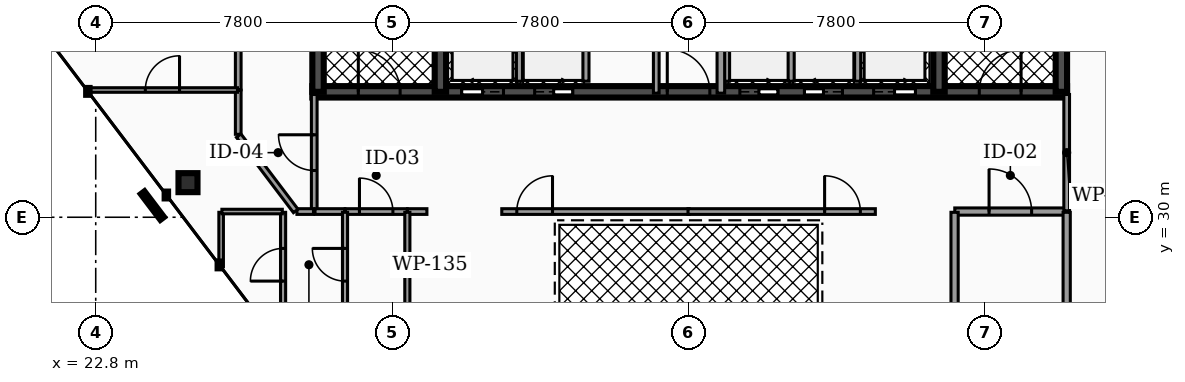
"""IFC4 building model, lengths in metres.
Left out: names, types, materials, properties, quantities, classifications, styles, units other than length and angle.
Written with IfcOpenShell. Run it as: python <this file> out.ifc"""

import sys

from ifc_helpers import new_model, si_unit, direction, frame, frame_2d, origin, origin_2d, place, context, subcontext, project, spatial, rectangle, hollow_rectangle, extrude, element, fill, save


model = new_model("IFC4")
c1 = context("Model", 3, precision=1e-05, world=origin(), true_north=direction((0.0, 1.0)))
c2 = subcontext(c1, "Body", "Model", "MODEL_VIEW")
j1 = project(units=[si_unit("LENGTHUNIT", "METRE"), si_unit("PLANEANGLEUNIT", "RADIAN")], contexts=[c1])
p1 = place(None, origin())
s1 = spatial("IfcSite", under=j1, at=p1, CompositionType="ELEMENT")
p2 = place(p1, origin())
s2 = spatial("IfcBuilding", under=s1, at=p2, CompositionType="ELEMENT")
p3 = place(p2, frame((0.0, 0.0, 258.4)))
s3 = spatial("IfcBuildingStorey", under=s2, at=p3, CompositionType="ELEMENT", Elevation=258.4)
p4 = place(p3, frame((28.5, 33.3, 0.0), z_axis=(0.0, 0.0, 1.0), x_axis=(1.0, 0.0, 0.0)))
e1 = element("IfcWall", 1, at=p4, inside=s3, PredefinedType="SHEAR", context=c2, shape_type="SweptSolid", body=[
    extrude(rectangle(XDim=19.86, YDim=0.3, at=frame_2d((9.93, 0.0))), origin(), (0.0, 0.0, 1.0), 3.18),
])
p5 = place(p4, frame((3.93, 0.0, 0.0)))
e2 = element("IfcOpeningElement", 2, at=p5, cuts=e1, PredefinedType="OPENING", context=c2, shape_type="SweptSolid", body=[
    extrude(rectangle(XDim=1.1, YDim=2.15, at=frame_2d((0.55, 1.075))), frame((0.0, 0.16, 0.0), z_axis=(0.0, -1.0, 0.0), x_axis=(1.0, 0.0, 0.0)), (0.0, 0.0, 1.0), 0.32),
])
p6 = place(p4, frame((14.77, 0.0, 0.0)))
e3 = element("IfcOpeningElement", 3, at=p6, cuts=e1, PredefinedType="OPENING", context=c2, shape_type="SweptSolid", body=[
    extrude(rectangle(XDim=1.1, YDim=2.15, at=frame_2d((0.55, 1.075))), frame((0.0, 0.16, 0.0), z_axis=(0.0, -1.0, 0.0), x_axis=(1.0, 0.0, 0.0)), (0.0, 0.0, 1.0), 0.32),
])
p7 = place(p4, frame((11.25, 0.0, 0.0)))
e4 = element("IfcOpeningElement", 4, at=p7, cuts=e1, PredefinedType="OPENING", context=c2, shape_type="SweptSolid", body=[
    extrude(rectangle(XDim=1.0, YDim=2.1, at=frame_2d((0.5, 1.05))), frame((0.0, 0.16, 0.0), z_axis=(0.0, -1.0, 0.0), x_axis=(1.0, 0.0, 0.0)), (0.0, 0.0, 1.0), 0.32),
])
p8 = place(p4, frame((12.95, 0.0, 0.0)))
e5 = element("IfcOpeningElement", 5, at=p8, cuts=e1, PredefinedType="OPENING", context=c2, shape_type="SweptSolid", body=[
    extrude(rectangle(XDim=1.0, YDim=2.1, at=frame_2d((0.5, 1.05))), frame((0.0, 0.16, 0.0), z_axis=(0.0, -1.0, 0.0), x_axis=(1.0, 0.0, 0.0)), (0.0, 0.0, 1.0), 0.32),
])
p9 = place(p4, frame((5.85, 0.0, 0.0)))
e6 = element("IfcOpeningElement", 6, at=p9, cuts=e1, PredefinedType="OPENING", context=c2, shape_type="SweptSolid", body=[
    extrude(rectangle(XDim=1.0, YDim=2.1, at=frame_2d((0.5, 1.05))), frame((0.0, 0.16, 0.0), z_axis=(0.0, -1.0, 0.0), x_axis=(1.0, 0.0, 0.0)), (0.0, 0.0, 1.0), 0.32),
])
p10 = place(p4, frame((1.21, 0.0, 0.0)))
e7 = element("IfcOpeningElement", 7, at=p10, cuts=e1, PredefinedType="OPENING", context=c2, shape_type="SweptSolid", body=[
    extrude(rectangle(XDim=1.1, YDim=2.2, at=frame_2d((0.55, 1.1))), frame((0.0, 0.16, 0.0), z_axis=(0.0, -1.0, 0.0), x_axis=(1.0, 0.0, 0.0)), (0.0, 0.0, 1.0), 0.32),
])
p11 = place(p4, frame((9.34, 0.0, 0.0)))
e8 = element("IfcOpeningElement", 8, at=p11, cuts=e1, PredefinedType="OPENING", context=c2, shape_type="SweptSolid", body=[
    extrude(rectangle(XDim=1.12, YDim=2.05, at=frame_2d((0.56, 1.025))), frame((0.0, 0.16, 0.0), z_axis=(0.0, -1.0, 0.0), x_axis=(1.0, 0.0, 0.0)), (0.0, 0.0, 1.0), 0.32),
])
p12 = place(p4, frame((17.55, 0.0, 0.0)))
e9 = element("IfcOpeningElement", 9, at=p12, cuts=e1, PredefinedType="OPENING", context=c2, shape_type="SweptSolid", body=[
    extrude(rectangle(XDim=1.1, YDim=2.2, at=frame_2d((0.55, 1.1))), frame((0.0, 0.16, 0.0), z_axis=(0.0, -1.0, 0.0), x_axis=(1.0, 0.0, 0.0)), (0.0, 0.0, 1.0), 0.32),
])
for number, where, z_axis, x_axis in (
    (10, (28.65, 33.3, 0.0), (0.0, 0.0, 1.0), (0.0, 1.0, 0.0)),
    (11, (31.87, 33.3, 0.0), (0.0, 0.0, 1.0), (0.0, 1.0, 0.0)),
    (12, (44.99, 33.3, 0.0), (0.0, 0.0, 1.0), (0.0, 1.0, 0.0)),
    (13, (48.21, 33.3, 0.0), (0.0, 0.0, 1.0), (0.0, 1.0, 0.0)),
):
    element("IfcWall", number, at=place(p3, frame(where, z_axis=z_axis, x_axis=x_axis)), inside=s3, PredefinedType="SHEAR", context=c2, shape_type="SweptSolid", body=[
        extrude(rectangle(XDim=10.1, YDim=0.3, at=frame_2d((5.05, 0.0))), origin(), (0.0, 0.0, 1.0), 3.18),
    ])
p13 = place(p3, frame((25.228, 30.91, 0.0), z_axis=(0.0, 0.0, 1.0), x_axis=(1.0, 0.0, 0.0)))
e14 = element("IfcColumn", 14, at=p13, inside=s3, PredefinedType="COLUMN", context=c2, shape_type="SweptSolid", body=[
    extrude(hollow_rectangle(XDim=0.5, YDim=0.5, WallThickness=0.025, at=origin_2d()), origin(), (0.0, 0.0, 1.0), 3.18),
])
for number, where, z_axis, x_axis in (
    (15, (33.95, 33.58, 0.0), (0.0, 0.0, 1.0), (0.0, 1.0, 0.0)),
    (16, (42.85, 33.58, 0.0), (0.0, 0.0, 1.0), (0.0, 1.0, 0.0)),
):
    element("IfcWall", number, at=place(p3, frame(where, z_axis=z_axis, x_axis=x_axis)), inside=s3, PredefinedType="SOLIDWALL", context=c2, shape_type="SweptSolid", body=[
        extrude(rectangle(XDim=2.45, YDim=0.16, at=frame_2d((1.225, 0.0))), origin(), (0.0, 0.0, 1.0), 3.18),
    ])
for number, where, z_axis, x_axis in (
    (17, (39.4, 33.58, 0.0), (0.0, 0.0, 1.0), (0.0, 1.0, 0.0)),
    (18, (41.1, 33.58, 0.0), (0.0, 0.0, 1.0), (0.0, 1.0, 0.0)),
    (19, (35.7, 33.58, 0.0), (0.0, 0.0, 1.0), (0.0, 1.0, 0.0)),
):
    element("IfcWall", number, at=place(p3, frame(where, z_axis=z_axis, x_axis=x_axis)), inside=s3, PredefinedType="SOLIDWALL", context=c2, shape_type="SweptSolid", body=[
        extrude(rectangle(XDim=2.25, YDim=0.16, at=frame_2d((1.125, 0.0))), origin(), (0.0, 0.0, 1.0), 3.18),
    ])
p14 = place(p3, frame((37.55, 33.265, 0.0), z_axis=(0.0, 0.0, 1.0), x_axis=(0.0, 1.0, 0.0)))
e20 = element("IfcWall", 20, at=p14, inside=s3, PredefinedType="PARTITIONING", context=c2, shape_type="SweptSolid", body=[
    extrude(rectangle(XDim=3.615, YDim=0.15, at=frame_2d((1.808, 0.0))), origin(), (0.0, 0.0, 1.0), 2.235),
])
p15 = place(p14, frame((1.337, 0.0, 0.0)))
e21 = element("IfcOpeningElement", 21, at=p15, cuts=e20, PredefinedType="OPENING", context=c2, shape_type="SweptSolid", body=[
    extrude(rectangle(XDim=0.94, YDim=2.05, at=frame_2d((0.47, 1.025))), frame((0.0, 0.085, 0.0), z_axis=(0.0, -1.0, 0.0), x_axis=(1.0, 0.0, 0.0)), (0.0, 0.0, 1.0), 0.17),
])
p16 = place(p3, frame((39.25, 33.265, 0.0), z_axis=(0.0, 0.0, 1.0), x_axis=(0.0, 1.0, 0.0)))
e22 = element("IfcWall", 22, at=p16, inside=s3, PredefinedType="PARTITIONING", context=c2, shape_type="SweptSolid", body=[
    extrude(rectangle(XDim=3.615, YDim=0.2, at=frame_2d((1.808, 0.0))), origin(), (0.0, 0.0, 1.0), 2.235),
])
p17 = place(p3, frame((45.405, 30.15, 0.0), z_axis=(0.0, 0.0, 1.0), x_axis=(1.0, 0.0, 0.0)))
e23 = element("IfcWall", 23, at=p17, inside=s3, PredefinedType="PARTITIONING", context=c2, shape_type="SweptSolid", body=[
    extrude(rectangle(XDim=2.925, YDim=0.19, at=frame_2d((1.462, 0.0))), origin(), (0.0, 0.0, 1.0), 2.235),
])
p18 = place(p17, frame((0.903, 0.0, 0.0)))
e24 = element("IfcOpeningElement", 24, at=p18, cuts=e23, PredefinedType="OPENING", context=c2, shape_type="SweptSolid", body=[
    extrude(rectangle(XDim=1.12, YDim=2.05, at=frame_2d((0.56, 1.025))), frame((0.0, 0.105, 0.0), z_axis=(0.0, -1.0, 0.0), x_axis=(1.0, 0.0, 0.0)), (0.0, 0.0, 1.0), 0.21),
])
p19 = place(p3, frame((28.55, 30.17, 0.0), z_axis=(0.0, 0.0, 1.0), x_axis=(0.0, 1.0, 0.0)))
e25 = element("IfcWall", 25, at=p19, inside=s3, PredefinedType="PARTITIONING", context=c2, shape_type="SweptSolid", body=[
    extrude(rectangle(XDim=3.06, YDim=0.15, at=frame_2d((1.53, 0.0))), origin(), (0.0, 0.0, 1.0), 2.235),
])
p20 = place(p19, frame((1.06, 0.0, 0.0)))
e26 = element("IfcOpeningElement", 26, at=p20, cuts=e25, PredefinedType="OPENING", context=c2, shape_type="SweptSolid", body=[
    extrude(rectangle(XDim=0.94, YDim=2.05, at=frame_2d((0.47, 1.025))), frame((0.0, 0.085, 0.0), z_axis=(0.0, -1.0, 0.0), x_axis=(1.0, 0.0, 0.0)), (0.0, 0.0, 1.0), 0.17),
])
p21 = place(p3, frame((48.35, 30.17, 0.0), z_axis=(0.0, 0.0, 1.0), x_axis=(0.0, 1.0, 0.0)))
e27 = element("IfcWall", 27, at=p21, inside=s3, PredefinedType="PARTITIONING", context=c2, shape_type="SweptSolid", body=[
    extrude(rectangle(XDim=3.06, YDim=0.15, at=frame_2d((1.53, 0.0))), origin(), (0.0, 0.0, 1.0), 2.235),
])
p22 = place(p3, frame((28.57, 30.15, 0.0), z_axis=(0.0, 0.0, 1.0), x_axis=(1.0, 0.0, 0.0)))
e28 = element("IfcWall", 28, at=p22, inside=s3, PredefinedType="PARTITIONING", context=c2, shape_type="SweptSolid", body=[
    extrude(rectangle(XDim=0.785, YDim=0.15, at=frame_2d((0.393, 0.0))), origin(), (0.0, 0.0, 1.0), 2.235),
])
p23 = place(p3, frame((29.365, 30.15, 0.0), z_axis=(0.0, 0.0, 1.0), x_axis=(1.0, 0.0, 0.0)))
e29 = element("IfcWall", 29, at=p23, inside=s3, PredefinedType="PARTITIONING", context=c2, shape_type="SweptSolid", body=[
    extrude(rectangle(XDim=1.63, YDim=0.15, at=frame_2d((0.815, 0.0))), origin(), (0.0, 0.0, 1.0), 2.235),
])
p24 = place(p23, frame((0.375, 0.0, 0.0)))
e30 = element("IfcOpeningElement", 30, at=p24, cuts=e29, PredefinedType="OPENING", context=c2, shape_type="SweptSolid", body=[
    extrude(rectangle(XDim=0.88, YDim=2.05, at=frame_2d((0.44, 1.025))), frame((0.0, 0.085, 0.0), z_axis=(0.0, -1.0, 0.0), x_axis=(1.0, 0.0, 0.0)), (0.0, 0.0, 1.0), 0.17),
])
p25 = place(p3, frame((33.485, 30.15, 0.0), z_axis=(0.0, 0.0, 1.0), x_axis=(1.0, 0.0, 0.0)))
e31 = element("IfcWall", 31, at=p25, inside=s3, PredefinedType="PARTITIONING", context=c2, shape_type="SweptSolid", body=[
    extrude(rectangle(XDim=4.93, YDim=0.15, at=frame_2d((2.465, 0.0))), origin(), (0.0, 0.0, 1.0), 2.235),
])
p26 = place(p25, frame((0.395, 0.0, 0.0)))
e32 = element("IfcOpeningElement", 32, at=p26, cuts=e31, PredefinedType="OPENING", context=c2, shape_type="SweptSolid", body=[
    extrude(rectangle(XDim=0.94, YDim=2.05, at=frame_2d((0.47, 1.025))), frame((0.0, 0.085, 0.0), z_axis=(0.0, -1.0, 0.0), x_axis=(1.0, 0.0, 0.0)), (0.0, 0.0, 1.0), 0.17),
])
p27 = place(p3, frame((31.005, 30.15, 0.0), z_axis=(0.0, 0.0, 1.0), x_axis=(1.0, 0.0, 0.0)))
e33 = element("IfcWall", 33, at=p27, inside=s3, PredefinedType="PARTITIONING", context=c2, shape_type="SweptSolid", body=[
    extrude(rectangle(XDim=0.51, YDim=0.15, at=frame_2d((0.255, 0.0))), origin(), (0.0, 0.0, 1.0), 2.235),
])
p28 = place(p3, frame((38.385, 30.15, 0.0), z_axis=(0.0, 0.0, 1.0), x_axis=(1.0, 0.0, 0.0)))
e34 = element("IfcWall", 34, at=p28, inside=s3, PredefinedType="PARTITIONING", context=c2, shape_type="SweptSolid", body=[
    extrude(rectangle(XDim=4.93, YDim=0.15, at=frame_2d((2.465, 0.0))), origin(), (0.0, 0.0, 1.0), 2.235),
])
p29 = place(p28, frame((3.595, 0.0, 0.0)))
e35 = element("IfcOpeningElement", 35, at=p29, cuts=e34, PredefinedType="OPENING", context=c2, shape_type="SweptSolid", body=[
    extrude(rectangle(XDim=0.94, YDim=2.05, at=frame_2d((0.47, 1.025))), frame((0.0, 0.085, 0.0), z_axis=(0.0, -1.0, 0.0), x_axis=(1.0, 0.0, 0.0)), (0.0, 0.0, 1.0), 0.17),
])
for number, where, z_axis, x_axis in (
    (36, (45.4, 27.37, 0.0), (0.0, 0.0, 1.0), (0.0, 1.0, 0.0)),
    (37, (48.35, 27.37, 0.0), (0.0, 0.0, 1.0), (0.0, 1.0, 0.0)),
):
    element("IfcWall", number, at=place(p3, frame(where, z_axis=z_axis, x_axis=x_axis)), inside=s3, PredefinedType="PARTITIONING", context=c2, shape_type="SweptSolid", body=[
        extrude(rectangle(XDim=2.76, YDim=0.19, at=frame_2d((1.38, 0.0))), origin(), (0.0, 0.0, 1.0), 2.235),
    ])
p30 = place(p3, frame((28.094, 30.15, 0.0), z_axis=(0.0, 0.0, 1.0), x_axis=(1.0, 0.0, 0.0)))
e38 = element("IfcWall", 38, at=p30, inside=s3, PredefinedType="PARTITIONING", context=c2, shape_type="SweptSolid", body=[
    extrude(rectangle(XDim=0.436, YDim=0.15, at=frame_2d((0.218, 0.0))), origin(), (0.0, 0.0, 1.0), 2.235),
])
p31 = place(p3, frame((26.55, 33.353, 0.0), z_axis=(0.0, 0.0, 1.0), x_axis=(0.0, 1.0, 0.0)))
e39 = element("IfcWall", 39, at=p31, inside=s3, PredefinedType="PARTITIONING", context=c2, shape_type="SweptSolid", body=[
    extrude(rectangle(XDim=10.197, YDim=0.15, at=frame_2d((5.099, 0.0))), origin(), (0.0, 0.0, 1.0), 2.235),
])
p32 = place(p31, frame((4.628, 0.0, 0.0)))
e40 = element("IfcOpeningElement", 40, at=p32, cuts=e39, PredefinedType="OPENING", context=c2, shape_type="SweptSolid", body=[
    extrude(rectangle(XDim=0.94, YDim=2.05, at=frame_2d((0.47, 1.025))), frame((0.0, 0.085, 0.0), z_axis=(0.0, -1.0, 0.0), x_axis=(1.0, 0.0, 0.0)), (0.0, 0.0, 1.0), 0.17),
])
p33 = place(p3, frame((26.562, 32.146, 0.0), z_axis=(0.0, 0.0, 1.0), x_axis=(0.603891739408, -0.797066350485, 0.0)))
e41 = element("IfcWall", 41, at=p33, inside=s3, PredefinedType="PARTITIONING", context=c2, shape_type="SweptSolid", body=[
    extrude(rectangle(XDim=2.485, YDim=0.15, at=frame_2d((1.242, 0.0))), origin(), (0.0, 0.0, 1.0), 2.235),
])
p34 = place(p3, frame((26.55, 32.183, 0.0), z_axis=(0.0, 0.0, 1.0), x_axis=(0.0, 1.0, 0.0)))
e42 = element("IfcWall", 42, at=p34, inside=s3, PredefinedType="PARTITIONING", context=c2, shape_type="SweptSolid", body=[
    extrude(rectangle(XDim=1.16, YDim=0.15, at=frame_2d((0.58, 0.0))), origin(), (0.0, 0.0, 1.0), 2.235),
])
p35 = place(p3, frame((29.36, 27.37, 0.0), z_axis=(0.0, 0.0, 1.0), x_axis=(0.0, 1.0, 0.0)))
e43 = element("IfcWall", 43, at=p35, inside=s3, PredefinedType="PARTITIONING", context=c2, shape_type="SweptSolid", body=[
    extrude(rectangle(XDim=2.76, YDim=0.135, at=frame_2d((1.38, 0.0))), origin(), (0.0, 0.0, 1.0), 2.235),
])
p36 = place(p35, frame((0.95, 0.0, 0.0)))
e44 = element("IfcOpeningElement", 44, at=p36, cuts=e43, PredefinedType="OPENING", context=c2, shape_type="SweptSolid", body=[
    extrude(rectangle(XDim=0.86, YDim=2.05, at=frame_2d((0.43, 1.025))), frame((0.0, 0.077, 0.0), z_axis=(0.0, -1.0, 0.0), x_axis=(1.0, 0.0, 0.0)), (0.0, 0.0, 1.0), 0.155),
])
p37 = place(p3, frame((27.73, 27.37, 0.0), z_axis=(0.0, 0.0, 1.0), x_axis=(0.0, 1.0, 0.0)))
e45 = element("IfcWall", 45, at=p37, inside=s3, PredefinedType="PARTITIONING", context=c2, shape_type="SweptSolid", body=[
    extrude(rectangle(XDim=2.76, YDim=0.135, at=frame_2d((1.38, 0.0))), origin(), (0.0, 0.0, 1.0), 2.235),
])
p38 = place(p37, frame((0.95, 0.0, 0.0)))
e46 = element("IfcOpeningElement", 46, at=p38, cuts=e45, PredefinedType="OPENING", context=c2, shape_type="SweptSolid", body=[
    extrude(rectangle(XDim=0.86, YDim=2.05, at=frame_2d((0.43, 1.025))), frame((0.0, 0.077, 0.0), z_axis=(0.0, -1.0, 0.0), x_axis=(1.0, 0.0, 0.0)), (0.0, 0.0, 1.0), 0.155),
])
p39 = place(p3, frame((31.0, 27.37, 0.0), z_axis=(0.0, 0.0, 1.0), x_axis=(0.0, 1.0, 0.0)))
e47 = element("IfcWall", 47, at=p39, inside=s3, PredefinedType="PARTITIONING", context=c2, shape_type="SweptSolid", body=[
    extrude(rectangle(XDim=2.76, YDim=0.135, at=frame_2d((1.38, 0.0))), origin(), (0.0, 0.0, 1.0), 2.235),
])
p40 = place(p3, frame((26.1, 28.698, 0.0), z_axis=(0.0, 0.0, 1.0), x_axis=(0.0, 1.0, 0.0)))
e48 = element("IfcWall", 48, at=p40, inside=s3, PredefinedType="PARTITIONING", context=c2, shape_type="SweptSolid", body=[
    extrude(rectangle(XDim=1.432, YDim=0.12, at=frame_2d((0.716, 0.0))), origin(), (0.0, 0.0, 1.0), 2.235),
])
p41 = place(p3, frame((26.12, 30.15, 0.0), z_axis=(0.0, 0.0, 1.0), x_axis=(1.0, 0.0, 0.0)))
e49 = element("IfcWall", 49, at=p41, inside=s3, PredefinedType="PARTITIONING", context=c2, shape_type="SweptSolid", body=[
    extrude(rectangle(XDim=1.59, YDim=0.12, at=frame_2d((0.795, 0.0))), origin(), (0.0, 0.0, 1.0), 2.235),
])
p42 = place(p3, frame((22.581, 33.348, 0.0), z_axis=(0.0, 0.0, 1.0), x_axis=(1.0, 0.0, 0.0)))
e50 = element("IfcWall", 50, at=p42, inside=s3, PredefinedType="PARTITIONING", context=c2, shape_type="SweptSolid", body=[
    extrude(rectangle(XDim=3.949, YDim=0.12, at=frame_2d((1.975, 0.0))), origin(), (0.0, 0.0, 1.0), 2.235),
])
p43 = place(p42, frame((1.525, 0.0, 0.0)))
e51 = element("IfcOpeningElement", 51, at=p43, cuts=e50, PredefinedType="OPENING", context=c2, shape_type="SweptSolid", body=[
    extrude(rectangle(XDim=0.9, YDim=2.05, at=frame_2d((0.45, 1.025))), frame((0.0, 0.07, 0.0), z_axis=(0.0, -1.0, 0.0), x_axis=(1.0, 0.0, 0.0)), (0.0, 0.0, 1.0), 0.14),
])
p44 = place(p5, origin())
e52 = element("IfcDoor", 52, at=p44, inside=s3, OperationType="SLIDING_TO_LEFT", PredefinedType="DOOR", context=c2, shape_type="SweptSolid", body=[
    extrude(rectangle(XDim=1.1, YDim=2.15, at=frame_2d((0.55, 1.075))), frame((0.0, 0.025, 0.0), z_axis=(0.0, -1.0, 0.0), x_axis=(1.0, 0.0, 0.0)), (0.0, 0.0, 1.0), 0.05),
])
fill(e2, e52)
p45 = place(p6, origin())
e53 = element("IfcDoor", 53, at=p45, inside=s3, OperationType="SLIDING_TO_RIGHT", PredefinedType="DOOR", context=c2, shape_type="SweptSolid", body=[
    extrude(rectangle(XDim=1.1, YDim=2.15, at=frame_2d((0.55, 1.075))), frame((0.0, 0.025, 0.0), z_axis=(0.0, -1.0, 0.0), x_axis=(1.0, 0.0, 0.0)), (0.0, 0.0, 1.0), 0.05),
])
fill(e3, e53)
p46 = place(p7, origin())
e54 = element("IfcDoor", 54, at=p46, inside=s3, OperationType="SLIDING_TO_RIGHT", PredefinedType="DOOR", context=c2, shape_type="SweptSolid", body=[
    extrude(rectangle(XDim=1.0, YDim=2.1, at=frame_2d((0.5, 1.05))), frame((0.0, 0.025, 0.0), z_axis=(0.0, -1.0, 0.0), x_axis=(1.0, 0.0, 0.0)), (0.0, 0.0, 1.0), 0.05),
])
fill(e4, e54)
p47 = place(p8, origin())
e55 = element("IfcDoor", 55, at=p47, inside=s3, OperationType="SLIDING_TO_LEFT", PredefinedType="DOOR", context=c2, shape_type="SweptSolid", body=[
    extrude(rectangle(XDim=1.0, YDim=2.1, at=frame_2d((0.5, 1.05))), frame((0.0, 0.025, 0.0), z_axis=(0.0, -1.0, 0.0), x_axis=(1.0, 0.0, 0.0)), (0.0, 0.0, 1.0), 0.05),
])
fill(e5, e55)
p48 = place(p9, origin())
e56 = element("IfcDoor", 56, at=p48, inside=s3, OperationType="SLIDING_TO_RIGHT", PredefinedType="DOOR", context=c2, shape_type="SweptSolid", body=[
    extrude(rectangle(XDim=1.0, YDim=2.1, at=frame_2d((0.5, 1.05))), frame((0.0, 0.025, 0.0), z_axis=(0.0, -1.0, 0.0), x_axis=(1.0, 0.0, 0.0)), (0.0, 0.0, 1.0), 0.05),
])
fill(e6, e56)
p49 = place(p10, origin())
e57 = element("IfcDoor", 57, at=p49, inside=s3, OperationType="SINGLE_SWING_LEFT", PredefinedType="DOOR", context=c2, shape_type="SweptSolid", body=[
    extrude(rectangle(XDim=1.1, YDim=2.2, at=frame_2d((0.55, 1.1))), frame((0.0, 0.025, 0.0), z_axis=(0.0, -1.0, 0.0), x_axis=(1.0, 0.0, 0.0)), (0.0, 0.0, 1.0), 0.05),
])
fill(e7, e57)
p50 = place(p11, origin())
e58 = element("IfcDoor", 58, at=p50, inside=s3, OperationType="SINGLE_SWING_LEFT", PredefinedType="DOOR", context=c2, shape_type="SweptSolid", body=[
    extrude(rectangle(XDim=1.12, YDim=2.05, at=frame_2d((0.56, 1.025))), frame((0.0, 0.025, 0.0), z_axis=(0.0, -1.0, 0.0), x_axis=(1.0, 0.0, 0.0)), (0.0, 0.0, 1.0), 0.05),
])
fill(e8, e58)
p51 = place(p12, origin())
e59 = element("IfcDoor", 59, at=p51, inside=s3, OperationType="SINGLE_SWING_RIGHT", PredefinedType="DOOR", context=c2, shape_type="SweptSolid", body=[
    extrude(rectangle(XDim=1.1, YDim=2.2, at=frame_2d((0.55, 1.1))), frame((0.0, 0.025, 0.0), z_axis=(0.0, -1.0, 0.0), x_axis=(1.0, 0.0, 0.0)), (0.0, 0.0, 1.0), 0.05),
])
fill(e9, e59)
p52 = place(p18, origin())
e60 = element("IfcDoor", 60, at=p52, inside=s3, OperationType="SINGLE_SWING_LEFT", PredefinedType="DOOR", context=c2, shape_type="SweptSolid", body=[
    extrude(rectangle(XDim=1.12, YDim=2.05, at=frame_2d((0.56, 1.025))), frame((0.0, 0.025, 0.0), z_axis=(0.0, -1.0, 0.0), x_axis=(1.0, 0.0, 0.0)), (0.0, 0.0, 1.0), 0.05),
])
fill(e24, e60)
p53 = place(p20, origin())
e61 = element("IfcDoor", 61, at=p53, inside=s3, OperationType="SINGLE_SWING_RIGHT", PredefinedType="DOOR", context=c2, shape_type="SweptSolid", body=[
    extrude(rectangle(XDim=0.94, YDim=2.05, at=frame_2d((0.47, 1.025))), frame((0.0, 0.025, 0.0), z_axis=(0.0, -1.0, 0.0), x_axis=(1.0, 0.0, 0.0)), (0.0, 0.0, 1.0), 0.05),
])
fill(e26, e61)
p54 = place(p24, origin())
e62 = element("IfcDoor", 62, at=p54, inside=s3, OperationType="SINGLE_SWING_LEFT", PredefinedType="DOOR", context=c2, shape_type="SweptSolid", body=[
    extrude(rectangle(XDim=0.88, YDim=2.05, at=frame_2d((0.44, 1.025))), frame((0.0, 0.025, 0.0), z_axis=(0.0, -1.0, 0.0), x_axis=(1.0, 0.0, 0.0)), (0.0, 0.0, 1.0), 0.05),
])
fill(e30, e62)
p55 = place(p26, origin())
e63 = element("IfcDoor", 63, at=p55, inside=s3, OperationType="SINGLE_SWING_RIGHT", PredefinedType="DOOR", context=c2, shape_type="SweptSolid", body=[
    extrude(rectangle(XDim=0.94, YDim=2.05, at=frame_2d((0.47, 1.025))), frame((0.0, 0.025, 0.0), z_axis=(0.0, -1.0, 0.0), x_axis=(1.0, 0.0, 0.0)), (0.0, 0.0, 1.0), 0.05),
])
fill(e32, e63)
p56 = place(p29, origin())
e64 = element("IfcDoor", 64, at=p56, inside=s3, OperationType="SINGLE_SWING_LEFT", PredefinedType="DOOR", context=c2, shape_type="SweptSolid", body=[
    extrude(rectangle(XDim=0.94, YDim=2.05, at=frame_2d((0.47, 1.025))), frame((0.0, 0.025, 0.0), z_axis=(0.0, -1.0, 0.0), x_axis=(1.0, 0.0, 0.0)), (0.0, 0.0, 1.0), 0.05),
])
fill(e35, e64)
p57 = place(p36, origin())
e65 = element("IfcDoor", 65, at=p57, inside=s3, OperationType="SINGLE_SWING_RIGHT", PredefinedType="DOOR", context=c2, shape_type="SweptSolid", body=[
    extrude(rectangle(XDim=0.86, YDim=2.05, at=frame_2d((0.43, 1.025))), frame((0.0, 0.025, 0.0), z_axis=(0.0, -1.0, 0.0), x_axis=(1.0, 0.0, 0.0)), (0.0, 0.0, 1.0), 0.05),
])
fill(e44, e65)
p58 = place(p38, origin())
e66 = element("IfcDoor", 66, at=p58, inside=s3, OperationType="SINGLE_SWING_LEFT", PredefinedType="DOOR", context=c2, shape_type="SweptSolid", body=[
    extrude(rectangle(XDim=0.86, YDim=2.05, at=frame_2d((0.43, 1.025))), frame((0.0, 0.025, 0.0), z_axis=(0.0, -1.0, 0.0), x_axis=(1.0, 0.0, 0.0)), (0.0, 0.0, 1.0), 0.05),
])
fill(e46, e66)
p59 = place(p43, origin())
e67 = element("IfcDoor", 67, at=p59, inside=s3, OperationType="SINGLE_SWING_RIGHT", PredefinedType="DOOR", context=c2, shape_type="SweptSolid", body=[
    extrude(rectangle(XDim=0.9, YDim=2.05, at=frame_2d((0.45, 1.025))), frame((0.0, 0.025, 0.0), z_axis=(0.0, -1.0, 0.0), x_axis=(1.0, 0.0, 0.0)), (0.0, 0.0, 1.0), 0.05),
])
fill(e51, e67)
save(model, sys.argv[1])
